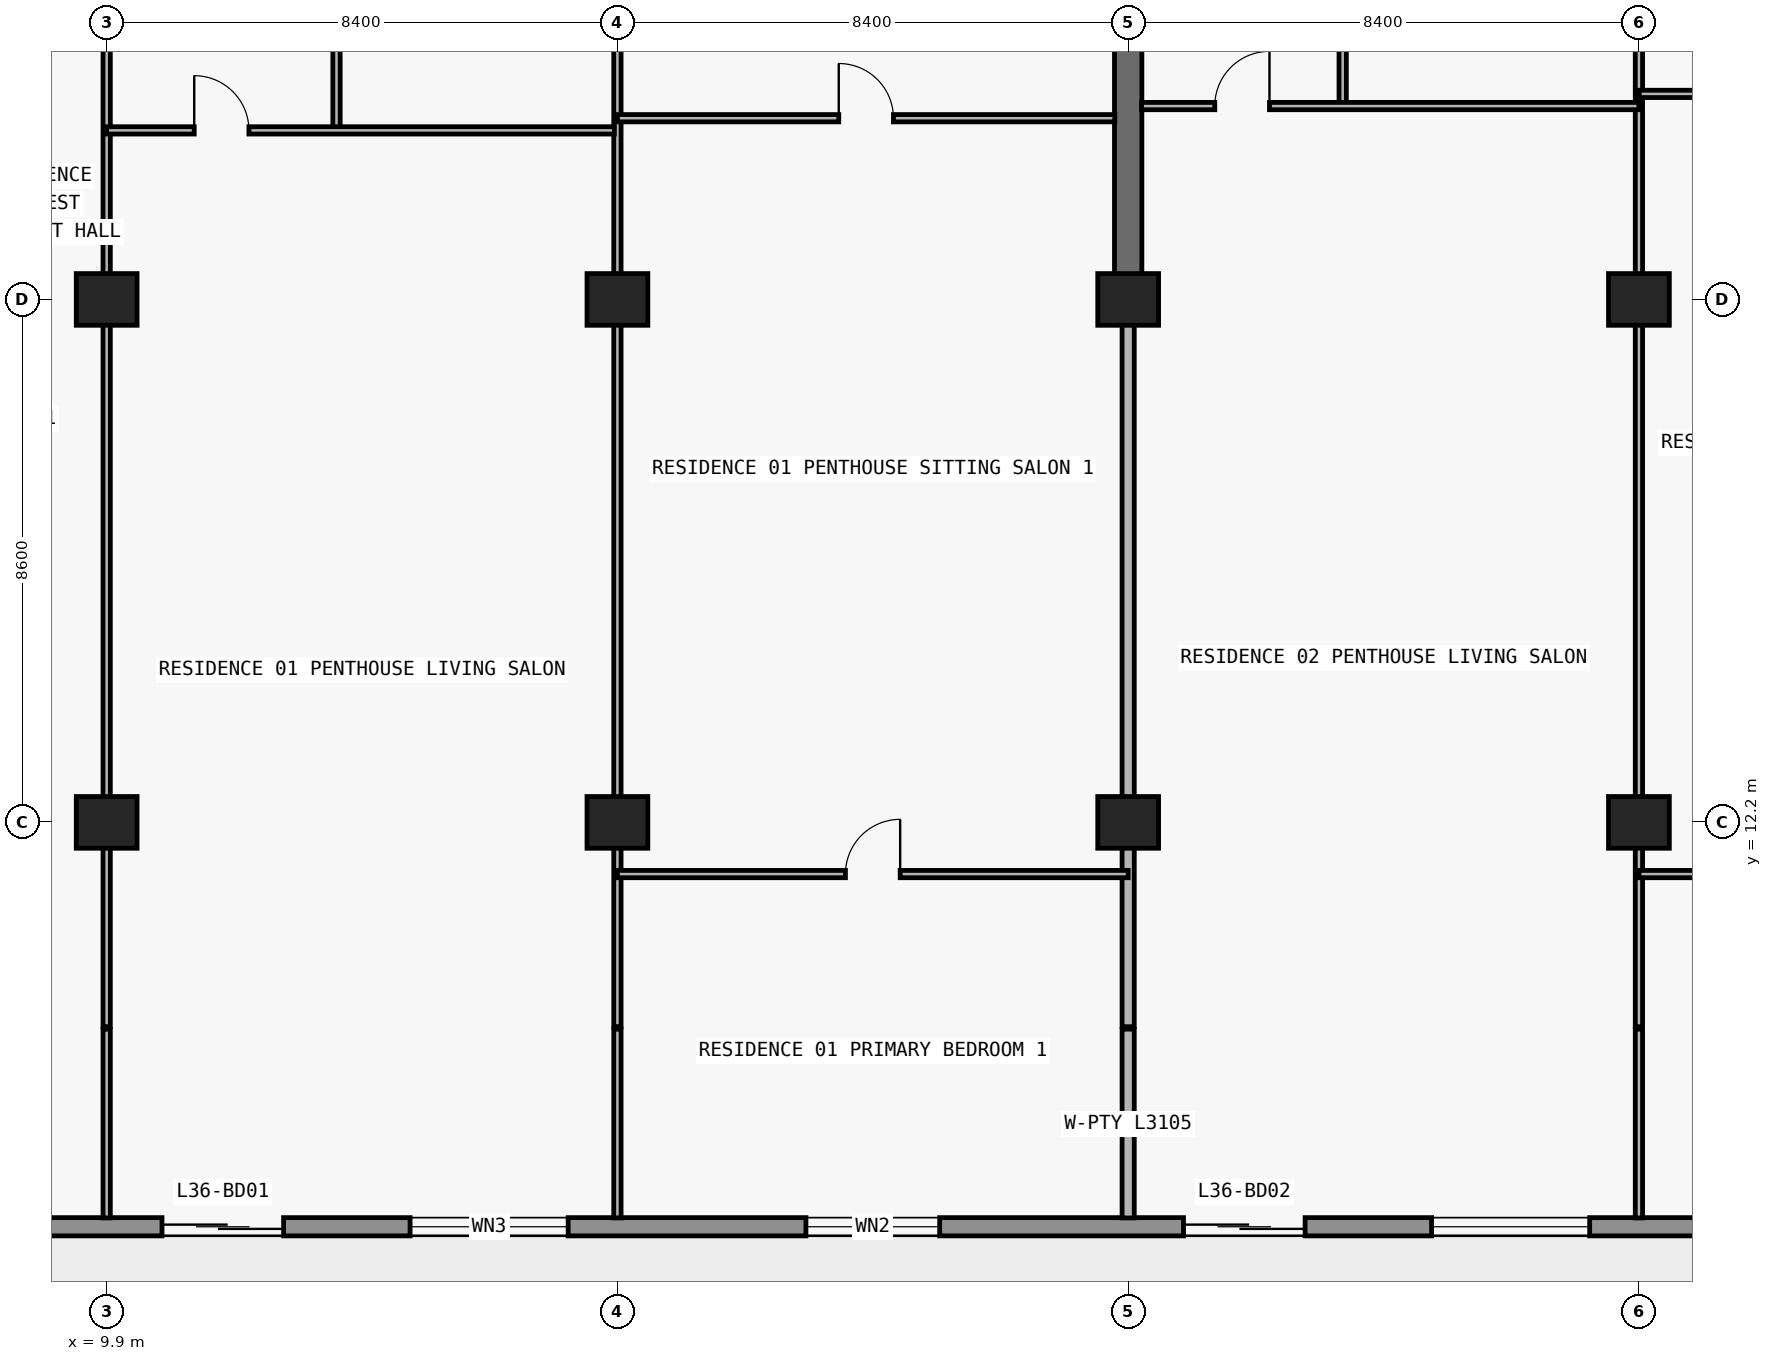
"""IFC4 building model, lengths in metres.
Left out: names, types, materials, properties, quantities, classifications, styles, units other than length and angle.
Written with IfcOpenShell. Run it as: python <this file> out.ifc"""

import sys

from ifc_helpers import new_model, si_unit, direction, frame, frame_2d, origin, origin_2d, place, context, subcontext, project, spatial, rectangle, extrude, element, fill, save


model = new_model("IFC4")
c1 = context("Model", 3, precision=1e-05, world=origin(), true_north=direction((0.0, 1.0)))
c2 = subcontext(c1, "Body", "Model", "MODEL_VIEW")
j1 = project(units=[si_unit("LENGTHUNIT", "METRE"), si_unit("PLANEANGLEUNIT", "RADIAN")], contexts=[c1])
p1 = place(None, origin())
s1 = spatial("IfcSite", under=j1, at=p1, CompositionType="ELEMENT")
p2 = place(p1, origin())
s2 = spatial("IfcBuilding", under=s1, at=p2, CompositionType="ELEMENT")
p3 = place(p2, frame((0.0, 0.0, 132.3)))
s3 = spatial("IfcBuildingStorey", under=s2, at=p3, CompositionType="ELEMENT", Elevation=132.3)
for number, where, z_axis, x_axis in (
    (1, (9.9, 12.2, 0.0), (0.0, 0.0, 1.0), (1.0, 0.0, 0.0)),
    (2, (18.3, 12.2, 0.0), (0.0, 0.0, 1.0), (1.0, 0.0, 0.0)),
    (3, (26.7, 12.2, 0.0), (0.0, 0.0, 1.0), (1.0, 0.0, 0.0)),
    (4, (35.1, 12.2, 0.0), (0.0, 0.0, 1.0), (1.0, 0.0, 0.0)),
    (5, (9.9, 20.8, 0.0), (0.0, 0.0, 1.0), (1.0, 0.0, 0.0)),
    (6, (18.3, 20.8, 0.0), (0.0, 0.0, 1.0), (1.0, 0.0, 0.0)),
    (7, (26.7, 20.8, 0.0), (0.0, 0.0, 1.0), (1.0, 0.0, 0.0)),
    (8, (35.1, 20.8, 0.0), (0.0, 0.0, 1.0), (1.0, 0.0, 0.0)),
):
    element("IfcColumn", number, at=place(p3, frame(where, z_axis=z_axis, x_axis=x_axis)), inside=s3, PredefinedType="COLUMN", context=c2, shape_type="SweptSolid", body=[
        extrude(rectangle(XDim=1.0, YDim=0.85, at=origin_2d()), origin(), (0.0, 0.0, 1.0), 3.05),
    ])
p4 = place(p3, frame((26.7, 20.8, 0.0), z_axis=(0.0, 0.0, 1.0), x_axis=(0.0, 1.0, 0.0)))
e9 = element("IfcWall", 9, at=p4, inside=s3, PredefinedType="SHEAR", context=c2, shape_type="SweptSolid", body=[
    extrude(rectangle(XDim=8.6, YDim=0.45, at=frame_2d((4.3, 0.0))), origin(), (0.0, 0.0, 1.0), 3.05),
])
p5 = place(p3, frame((70.1, 5.55, 0.0), z_axis=(0.0, 0.0, 1.0), x_axis=(-1.0, 0.0, 0.0)))
e10 = element("IfcWall", 10, at=p5, inside=s3, PredefinedType="STANDARD", context=c2, shape_type="SweptSolid", body=[
    extrude(rectangle(XDim=62.4, YDim=0.3, at=frame_2d((31.2, 0.0))), origin(), (0.0, 0.0, 1.0), 3.05),
])
p6 = place(p5, frame((57.29, 0.0, 0.0)))
e11 = element("IfcOpeningElement", 11, at=p6, cuts=e10, PredefinedType="OPENING", context=c2, shape_type="SweptSolid", body=[
    extrude(rectangle(XDim=2.0, YDim=2.3, at=frame_2d((1.0, 1.15))), frame((0.0, 0.16, 0.0), z_axis=(0.0, -1.0, 0.0), x_axis=(1.0, 0.0, 0.0)), (0.0, 0.0, 1.0), 0.32),
])
p7 = place(p5, frame((52.61, 0.0, 0.65)))
e12 = element("IfcOpeningElement", 12, at=p7, cuts=e10, PredefinedType="OPENING", context=c2, shape_type="SweptSolid", body=[
    extrude(rectangle(XDim=2.6, YDim=1.85, at=frame_2d((1.3, 0.925))), frame((0.0, 0.16, 0.0), z_axis=(0.0, -1.0, 0.0), x_axis=(1.0, 0.0, 0.0)), (0.0, 0.0, 1.0), 0.32),
])
p8 = place(p5, frame((46.5, 0.0, 0.85)))
e13 = element("IfcOpeningElement", 13, at=p8, cuts=e10, PredefinedType="OPENING", context=c2, shape_type="SweptSolid", body=[
    extrude(rectangle(XDim=2.2, YDim=1.55, at=frame_2d((1.1, 0.775))), frame((0.0, 0.16, 0.0), z_axis=(0.0, -1.0, 0.0), x_axis=(1.0, 0.0, 0.0)), (0.0, 0.0, 1.0), 0.32),
])
p9 = place(p5, frame((40.49, 0.0, 0.0)))
e14 = element("IfcOpeningElement", 14, at=p9, cuts=e10, PredefinedType="OPENING", context=c2, shape_type="SweptSolid", body=[
    extrude(rectangle(XDim=2.0, YDim=2.3, at=frame_2d((1.0, 1.15))), frame((0.0, 0.16, 0.0), z_axis=(0.0, -1.0, 0.0), x_axis=(1.0, 0.0, 0.0)), (0.0, 0.0, 1.0), 0.32),
])
p10 = place(p5, frame((35.81, 0.0, 0.65)))
e15 = element("IfcOpeningElement", 15, at=p10, cuts=e10, PredefinedType="OPENING", context=c2, shape_type="SweptSolid", body=[
    extrude(rectangle(XDim=2.6, YDim=1.85, at=frame_2d((1.3, 0.925))), frame((0.0, 0.16, 0.0), z_axis=(0.0, -1.0, 0.0), x_axis=(1.0, 0.0, 0.0)), (0.0, 0.0, 1.0), 0.32),
])
p11 = place(p5, frame((30.1, 0.0, 0.85)))
e16 = element("IfcOpeningElement", 16, at=p11, cuts=e10, PredefinedType="OPENING", context=c2, shape_type="SweptSolid", body=[
    extrude(rectangle(XDim=2.2, YDim=1.55, at=frame_2d((1.1, 0.775))), frame((0.0, 0.16, 0.0), z_axis=(0.0, -1.0, 0.0), x_axis=(1.0, 0.0, 0.0)), (0.0, 0.0, 1.0), 0.32),
])
p12 = place(p5, frame((22.1, 0.0, 0.85)))
e17 = element("IfcOpeningElement", 17, at=p12, cuts=e10, PredefinedType="OPENING", context=c2, shape_type="SweptSolid", body=[
    extrude(rectangle(XDim=2.2, YDim=1.55, at=frame_2d((1.1, 0.775))), frame((0.0, 0.16, 0.0), z_axis=(0.0, -1.0, 0.0), x_axis=(1.0, 0.0, 0.0)), (0.0, 0.0, 1.0), 0.32),
])
p13 = place(p5, frame((16.026, 0.0, 0.0)))
e18 = element("IfcOpeningElement", 18, at=p13, cuts=e10, PredefinedType="OPENING", context=c2, shape_type="SweptSolid", body=[
    extrude(rectangle(XDim=2.0, YDim=2.3, at=frame_2d((1.0, 1.15))), frame((0.0, 0.16, 0.0), z_axis=(0.0, -1.0, 0.0), x_axis=(1.0, 0.0, 0.0)), (0.0, 0.0, 1.0), 0.32),
])
p14 = place(p5, frame((11.726, 0.0, 0.85)))
e19 = element("IfcOpeningElement", 19, at=p14, cuts=e10, PredefinedType="OPENING", context=c2, shape_type="SweptSolid", body=[
    extrude(rectangle(XDim=2.2, YDim=1.55, at=frame_2d((1.1, 0.775))), frame((0.0, 0.16, 0.0), z_axis=(0.0, -1.0, 0.0), x_axis=(1.0, 0.0, 0.0)), (0.0, 0.0, 1.0), 0.32),
])
p15 = place(p5, frame((7.29, 0.0, 0.0)))
e20 = element("IfcOpeningElement", 20, at=p15, cuts=e10, PredefinedType="OPENING", context=c2, shape_type="SweptSolid", body=[
    extrude(rectangle(XDim=2.0, YDim=2.3, at=frame_2d((1.0, 1.15))), frame((0.0, 0.16, 0.0), z_axis=(0.0, -1.0, 0.0), x_axis=(1.0, 0.0, 0.0)), (0.0, 0.0, 1.0), 0.32),
])
p16 = place(p5, frame((3.19, 0.0, 0.85)))
e21 = element("IfcOpeningElement", 21, at=p16, cuts=e10, PredefinedType="OPENING", context=c2, shape_type="SweptSolid", body=[
    extrude(rectangle(XDim=1.8, YDim=1.55, at=frame_2d((0.9, 0.775))), frame((0.0, 0.16, 0.0), z_axis=(0.0, -1.0, 0.0), x_axis=(1.0, 0.0, 0.0)), (0.0, 0.0, 1.0), 0.32),
])
p17 = place(p3, frame((9.9, 5.695, 0.0), z_axis=(0.0, 0.0, 1.0), x_axis=(0.0, 1.0, 0.0)))
e22 = element("IfcWall", 22, at=p17, inside=s3, PredefinedType="PARTITIONING", context=c2, shape_type="SweptSolid", body=[
    extrude(rectangle(XDim=3.105, YDim=0.12, at=frame_2d((1.552, 0.0))), origin(), (0.0, 0.0, 1.0), 3.05),
])
p18 = place(p3, frame((9.9, 8.84, 0.0), z_axis=(0.0, 0.0, 1.0), x_axis=(0.0, 1.0, 0.0)))
e23 = element("IfcWall", 23, at=p18, inside=s3, PredefinedType="PARTITIONING", context=c2, shape_type="SweptSolid", body=[
    extrude(rectangle(XDim=19.94, YDim=0.12, at=frame_2d((9.97, 0.0))), origin(), (0.0, 0.0, 1.0), 2.174),
])
p19 = place(p18, frame((16.69, 0.0, 0.0)))
e24 = element("IfcOpeningElement", 24, at=p19, cuts=e23, PredefinedType="OPENING", context=c2, shape_type="SweptSolid", body=[
    extrude(rectangle(XDim=0.9, YDim=2.124, at=frame_2d((0.45, 1.062))), frame((0.0, 0.07, 0.0), z_axis=(0.0, -1.0, 0.0), x_axis=(1.0, 0.0, 0.0)), (0.0, 0.0, 1.0), 0.14),
])
p20 = place(p3, frame((13.68, 23.58, 0.0), z_axis=(0.0, 0.0, 1.0), x_axis=(0.0, 1.0, 0.0)))
e25 = element("IfcWall", 25, at=p20, inside=s3, PredefinedType="PARTITIONING", context=c2, shape_type="SweptSolid", body=[
    extrude(rectangle(XDim=4.8, YDim=0.12, at=frame_2d((2.4, 0.0))), origin(), (0.0, 0.0, 1.0), 3.05),
])
p21 = place(p20, frame((1.95, 0.0, 0.0)))
e26 = element("IfcOpeningElement", 26, at=p21, cuts=e25, PredefinedType="OPENING", context=c2, shape_type="SweptSolid", body=[
    extrude(rectangle(XDim=0.9, YDim=2.15, at=frame_2d((0.45, 1.075))), frame((0.0, 0.07, 0.0), z_axis=(0.0, -1.0, 0.0), x_axis=(1.0, 0.0, 0.0)), (0.0, 0.0, 1.0), 0.14),
])
p22 = place(p3, frame((18.3, 5.695, 0.0), z_axis=(0.0, 0.0, 1.0), x_axis=(0.0, 1.0, 0.0)))
e27 = element("IfcWall", 27, at=p22, inside=s3, PredefinedType="PARTITIONING", context=c2, shape_type="SweptSolid", body=[
    extrude(rectangle(XDim=3.105, YDim=0.12, at=frame_2d((1.552, 0.0))), origin(), (0.0, 0.0, 1.0), 3.05),
])
p23 = place(p3, frame((18.3, 8.84, 0.0), z_axis=(0.0, 0.0, 1.0), x_axis=(0.0, 1.0, 0.0)))
e28 = element("IfcWall", 28, at=p23, inside=s3, PredefinedType="PARTITIONING", context=c2, shape_type="SweptSolid", body=[
    extrude(rectangle(XDim=19.94, YDim=0.12, at=frame_2d((9.97, 0.0))), origin(), (0.0, 0.0, 1.0), 2.174),
])
p24 = place(p23, frame((16.69, 0.0, 0.0)))
e29 = element("IfcOpeningElement", 29, at=p24, cuts=e28, PredefinedType="OPENING", context=c2, shape_type="SweptSolid", body=[
    extrude(rectangle(XDim=0.9, YDim=2.124, at=frame_2d((0.45, 1.062))), frame((0.0, 0.07, 0.0), z_axis=(0.0, -1.0, 0.0), x_axis=(1.0, 0.0, 0.0)), (0.0, 0.0, 1.0), 0.14),
])
p25 = place(p3, frame((26.7, 5.695, 0.0), z_axis=(0.0, 0.0, 1.0), x_axis=(0.0, 1.0, 0.0)))
e30 = element("IfcWall", 30, at=p25, inside=s3, PredefinedType="PARTITIONING", context=c2, shape_type="SweptSolid", body=[
    extrude(rectangle(XDim=3.105, YDim=0.2, at=frame_2d((1.552, 0.0))), origin(), (0.0, 0.0, 1.0), 3.05),
])
p26 = place(p3, frame((26.7, 8.84, 0.0), z_axis=(0.0, 0.0, 1.0), x_axis=(0.0, 1.0, 0.0)))
e31 = element("IfcWall", 31, at=p26, inside=s3, PredefinedType="PARTITIONING", context=c2, shape_type="SweptSolid", body=[
    extrude(rectangle(XDim=11.955, YDim=0.2, at=frame_2d((5.978, 0.0))), origin(), (0.0, 0.0, 1.0), 2.174),
])
p27 = place(p3, frame((30.228, 23.98, 0.0), z_axis=(0.0, 0.0, 1.0), x_axis=(0.0, 1.0, 0.0)))
e32 = element("IfcWall", 32, at=p27, inside=s3, PredefinedType="PARTITIONING", context=c2, shape_type="SweptSolid", body=[
    extrude(rectangle(XDim=4.8, YDim=0.12, at=frame_2d((2.4, 0.0))), origin(), (0.0, 0.0, 1.0), 3.05),
])
p28 = place(p27, frame((1.95, 0.0, 0.0)))
e33 = element("IfcOpeningElement", 33, at=p28, cuts=e32, PredefinedType="OPENING", context=c2, shape_type="SweptSolid", body=[
    extrude(rectangle(XDim=0.9, YDim=2.15, at=frame_2d((0.45, 1.075))), frame((0.0, 0.07, 0.0), z_axis=(0.0, -1.0, 0.0), x_axis=(1.0, 0.0, 0.0)), (0.0, 0.0, 1.0), 0.14),
])
p29 = place(p3, frame((35.1, 5.695, 0.0), z_axis=(0.0, 0.0, 1.0), x_axis=(0.0, 1.0, 0.0)))
e34 = element("IfcWall", 34, at=p29, inside=s3, PredefinedType="PARTITIONING", context=c2, shape_type="SweptSolid", body=[
    extrude(rectangle(XDim=3.105, YDim=0.12, at=frame_2d((1.552, 0.0))), origin(), (0.0, 0.0, 1.0), 3.05),
])
p30 = place(p3, frame((35.1, 8.84, 0.0), z_axis=(0.0, 0.0, 1.0), x_axis=(0.0, 1.0, 0.0)))
e35 = element("IfcWall", 35, at=p30, inside=s3, PredefinedType="PARTITIONING", context=c2, shape_type="SweptSolid", body=[
    extrude(rectangle(XDim=19.94, YDim=0.12, at=frame_2d((9.97, 0.0))), origin(), (0.0, 0.0, 1.0), 2.174),
])
p31 = place(p30, frame((17.09, 0.0, 0.0)))
e36 = element("IfcOpeningElement", 36, at=p31, cuts=e35, PredefinedType="OPENING", context=c2, shape_type="SweptSolid", body=[
    extrude(rectangle(XDim=0.9, YDim=2.124, at=frame_2d((0.45, 1.062))), frame((0.0, 0.07, 0.0), z_axis=(0.0, -1.0, 0.0), x_axis=(1.0, 0.0, 0.0)), (0.0, 0.0, 1.0), 0.14),
])
p32 = place(p3, frame((18.3, 11.35, 0.0), z_axis=(0.0, 0.0, 1.0), x_axis=(1.0, 0.0, 0.0)))
e37 = element("IfcWall", 37, at=p32, inside=s3, PredefinedType="PARTITIONING", context=c2, shape_type="SweptSolid", body=[
    extrude(rectangle(XDim=8.4, YDim=0.12, at=frame_2d((4.2, 0.0))), origin(), (0.0, 0.0, 1.0), 3.05),
])
p33 = place(p32, frame((3.75, 0.0, 0.0)))
e38 = element("IfcOpeningElement", 38, at=p33, cuts=e37, PredefinedType="OPENING", context=c2, shape_type="SweptSolid", body=[
    extrude(rectangle(XDim=0.9, YDim=2.15, at=frame_2d((0.45, 1.075))), frame((0.0, 0.07, 0.0), z_axis=(0.0, -1.0, 0.0), x_axis=(1.0, 0.0, 0.0)), (0.0, 0.0, 1.0), 0.14),
])
p34 = place(p3, frame((35.1, 11.35, 0.0), z_axis=(0.0, 0.0, 1.0), x_axis=(1.0, 0.0, 0.0)))
e39 = element("IfcWall", 39, at=p34, inside=s3, PredefinedType="PARTITIONING", context=c2, shape_type="SweptSolid", body=[
    extrude(rectangle(XDim=16.0, YDim=0.12, at=frame_2d((8.0, 0.0))), origin(), (0.0, 0.0, 1.0), 3.05),
])
p35 = place(p34, frame((3.35, 0.0, 0.0)))
e40 = element("IfcOpeningElement", 40, at=p35, cuts=e39, PredefinedType="OPENING", context=c2, shape_type="SweptSolid", body=[
    extrude(rectangle(XDim=0.9, YDim=2.15, at=frame_2d((0.45, 1.075))), frame((0.0, 0.07, 0.0), z_axis=(0.0, -1.0, 0.0), x_axis=(1.0, 0.0, 0.0)), (0.0, 0.0, 1.0), 0.14),
])
p36 = place(p34, frame((11.35, 0.0, 0.0)))
e41 = element("IfcOpeningElement", 41, at=p36, cuts=e39, PredefinedType="OPENING", context=c2, shape_type="SweptSolid", body=[
    extrude(rectangle(XDim=0.9, YDim=2.15, at=frame_2d((0.45, 1.075))), frame((0.0, 0.07, 0.0), z_axis=(0.0, -1.0, 0.0), x_axis=(1.0, 0.0, 0.0)), (0.0, 0.0, 1.0), 0.14),
])
p37 = place(p3, frame((9.9, 23.58, 0.0), z_axis=(0.0, 0.0, 1.0), x_axis=(1.0, 0.0, 0.0)))
e42 = element("IfcWall", 42, at=p37, inside=s3, PredefinedType="PARTITIONING", context=c2, shape_type="SweptSolid", body=[
    extrude(rectangle(XDim=8.35, YDim=0.12, at=frame_2d((4.175, 0.0))), origin(), (0.0, 0.0, 1.0), 3.05),
])
p38 = place(p37, frame((1.44, 0.0, 0.0)))
e43 = element("IfcOpeningElement", 43, at=p38, cuts=e42, PredefinedType="OPENING", context=c2, shape_type="SweptSolid", body=[
    extrude(rectangle(XDim=0.9, YDim=2.15, at=frame_2d((0.45, 1.075))), frame((0.0, 0.07, 0.0), z_axis=(0.0, -1.0, 0.0), x_axis=(1.0, 0.0, 0.0)), (0.0, 0.0, 1.0), 0.14),
])
p39 = place(p3, frame((18.3, 23.78, 0.0), z_axis=(0.0, 0.0, 1.0), x_axis=(1.0, 0.0, 0.0)))
e44 = element("IfcWall", 44, at=p39, inside=s3, PredefinedType="PARTITIONING", context=c2, shape_type="SweptSolid", body=[
    extrude(rectangle(XDim=8.18, YDim=0.12, at=frame_2d((4.09, 0.0))), origin(), (0.0, 0.0, 1.0), 3.05),
])
p40 = place(p39, frame((3.64, 0.0, 0.0)))
e45 = element("IfcOpeningElement", 45, at=p40, cuts=e44, PredefinedType="OPENING", context=c2, shape_type="SweptSolid", body=[
    extrude(rectangle(XDim=0.9, YDim=2.15, at=frame_2d((0.45, 1.075))), frame((0.0, 0.07, 0.0), z_axis=(0.0, -1.0, 0.0), x_axis=(1.0, 0.0, 0.0)), (0.0, 0.0, 1.0), 0.14),
])
p41 = place(p3, frame((26.92, 23.98, 0.0), z_axis=(0.0, 0.0, 1.0), x_axis=(1.0, 0.0, 0.0)))
e46 = element("IfcWall", 46, at=p41, inside=s3, PredefinedType="PARTITIONING", context=c2, shape_type="SweptSolid", body=[
    extrude(rectangle(XDim=8.18, YDim=0.12, at=frame_2d((4.09, 0.0))), origin(), (0.0, 0.0, 1.0), 3.05),
])
p42 = place(p41, frame((1.204, 0.0, 0.0)))
e47 = element("IfcOpeningElement", 47, at=p42, cuts=e46, PredefinedType="OPENING", context=c2, shape_type="SweptSolid", body=[
    extrude(rectangle(XDim=0.9, YDim=2.15, at=frame_2d((0.45, 1.075))), frame((0.0, 0.07, 0.0), z_axis=(0.0, -1.0, 0.0), x_axis=(1.0, 0.0, 0.0)), (0.0, 0.0, 1.0), 0.14),
])
p43 = place(p3, frame((35.105, 24.18, 0.0), z_axis=(0.0, 0.0, 1.0), x_axis=(1.0, 0.0, 0.0)))
e48 = element("IfcWall", 48, at=p43, inside=s3, PredefinedType="PARTITIONING", context=c2, shape_type="SweptSolid", body=[
    extrude(rectangle(XDim=7.59, YDim=0.12, at=frame_2d((3.795, 0.0))), origin(), (0.0, 0.0, 1.0), 3.05),
])
p44 = place(p43, frame((3.345, 0.0, 0.0)))
e49 = element("IfcOpeningElement", 49, at=p44, cuts=e48, PredefinedType="OPENING", context=c2, shape_type="SweptSolid", body=[
    extrude(rectangle(XDim=0.9, YDim=2.15, at=frame_2d((0.45, 1.075))), frame((0.0, 0.07, 0.0), z_axis=(0.0, -1.0, 0.0), x_axis=(1.0, 0.0, 0.0)), (0.0, 0.0, 1.0), 0.14),
])
p45 = place(p6, origin())
e50 = element("IfcDoor", 50, at=p45, inside=s3, OperationType="DOUBLE_DOOR_SLIDING", PredefinedType="DOOR", context=c2, shape_type="SweptSolid", body=[
    extrude(rectangle(XDim=2.0, YDim=2.3, at=frame_2d((1.0, 1.15))), frame((0.0, 0.025, 0.0), z_axis=(0.0, -1.0, 0.0), x_axis=(1.0, 0.0, 0.0)), (0.0, 0.0, 1.0), 0.05),
])
fill(e11, e50)
p46 = place(p7, origin())
e51 = element("IfcWindow", 51, at=p46, inside=s3, PartitioningType="SINGLE_PANEL", PredefinedType="WINDOW", context=c2, shape_type="SweptSolid", body=[
    extrude(rectangle(XDim=2.6, YDim=1.85, at=frame_2d((1.3, 0.925))), frame((0.0, 0.03, 0.0), z_axis=(0.0, -1.0, 0.0), x_axis=(1.0, 0.0, 0.0)), (0.0, 0.0, 1.0), 0.06),
])
fill(e12, e51)
p47 = place(p8, origin())
e52 = element("IfcWindow", 52, at=p47, inside=s3, PartitioningType="SINGLE_PANEL", PredefinedType="WINDOW", context=c2, shape_type="SweptSolid", body=[
    extrude(rectangle(XDim=2.2, YDim=1.55, at=frame_2d((1.1, 0.775))), frame((0.0, 0.03, 0.0), z_axis=(0.0, -1.0, 0.0), x_axis=(1.0, 0.0, 0.0)), (0.0, 0.0, 1.0), 0.06),
])
fill(e13, e52)
p48 = place(p9, origin())
e53 = element("IfcDoor", 53, at=p48, inside=s3, OperationType="DOUBLE_DOOR_SLIDING", PredefinedType="DOOR", context=c2, shape_type="SweptSolid", body=[
    extrude(rectangle(XDim=2.0, YDim=2.3, at=frame_2d((1.0, 1.15))), frame((0.0, 0.025, 0.0), z_axis=(0.0, -1.0, 0.0), x_axis=(1.0, 0.0, 0.0)), (0.0, 0.0, 1.0), 0.05),
])
fill(e14, e53)
p49 = place(p10, origin())
e54 = element("IfcWindow", 54, at=p49, inside=s3, PartitioningType="SINGLE_PANEL", PredefinedType="WINDOW", context=c2, shape_type="SweptSolid", body=[
    extrude(rectangle(XDim=2.6, YDim=1.85, at=frame_2d((1.3, 0.925))), frame((0.0, 0.03, 0.0), z_axis=(0.0, -1.0, 0.0), x_axis=(1.0, 0.0, 0.0)), (0.0, 0.0, 1.0), 0.06),
])
fill(e15, e54)
p50 = place(p38, origin())
e55 = element("IfcDoor", 55, at=p50, inside=s3, OperationType="SINGLE_SWING_LEFT", PredefinedType="DOOR", context=c2, shape_type="SweptSolid", body=[
    extrude(rectangle(XDim=0.9, YDim=2.15, at=frame_2d((0.45, 1.075))), frame((0.0, 0.025, 0.0), z_axis=(0.0, -1.0, 0.0), x_axis=(1.0, 0.0, 0.0)), (0.0, 0.0, 1.0), 0.05),
])
fill(e43, e55)
p51 = place(p40, origin())
e56 = element("IfcDoor", 56, at=p51, inside=s3, OperationType="SINGLE_SWING_LEFT", PredefinedType="DOOR", context=c2, shape_type="SweptSolid", body=[
    extrude(rectangle(XDim=0.9, YDim=2.15, at=frame_2d((0.45, 1.075))), frame((0.0, 0.025, 0.0), z_axis=(0.0, -1.0, 0.0), x_axis=(1.0, 0.0, 0.0)), (0.0, 0.0, 1.0), 0.05),
])
fill(e45, e56)
p52 = place(p33, origin())
e57 = element("IfcDoor", 57, at=p52, inside=s3, OperationType="SINGLE_SWING_RIGHT", PredefinedType="DOOR", context=c2, shape_type="SweptSolid", body=[
    extrude(rectangle(XDim=0.9, YDim=2.15, at=frame_2d((0.45, 1.075))), frame((0.0, 0.025, 0.0), z_axis=(0.0, -1.0, 0.0), x_axis=(1.0, 0.0, 0.0)), (0.0, 0.0, 1.0), 0.05),
])
fill(e38, e57)
p53 = place(p42, origin())
e58 = element("IfcDoor", 58, at=p53, inside=s3, OperationType="SINGLE_SWING_RIGHT", PredefinedType="DOOR", context=c2, shape_type="SweptSolid", body=[
    extrude(rectangle(XDim=0.9, YDim=2.15, at=frame_2d((0.45, 1.075))), frame((0.0, 0.025, 0.0), z_axis=(0.0, -1.0, 0.0), x_axis=(1.0, 0.0, 0.0)), (0.0, 0.0, 1.0), 0.05),
])
fill(e47, e58)
save(model, sys.argv[1])
